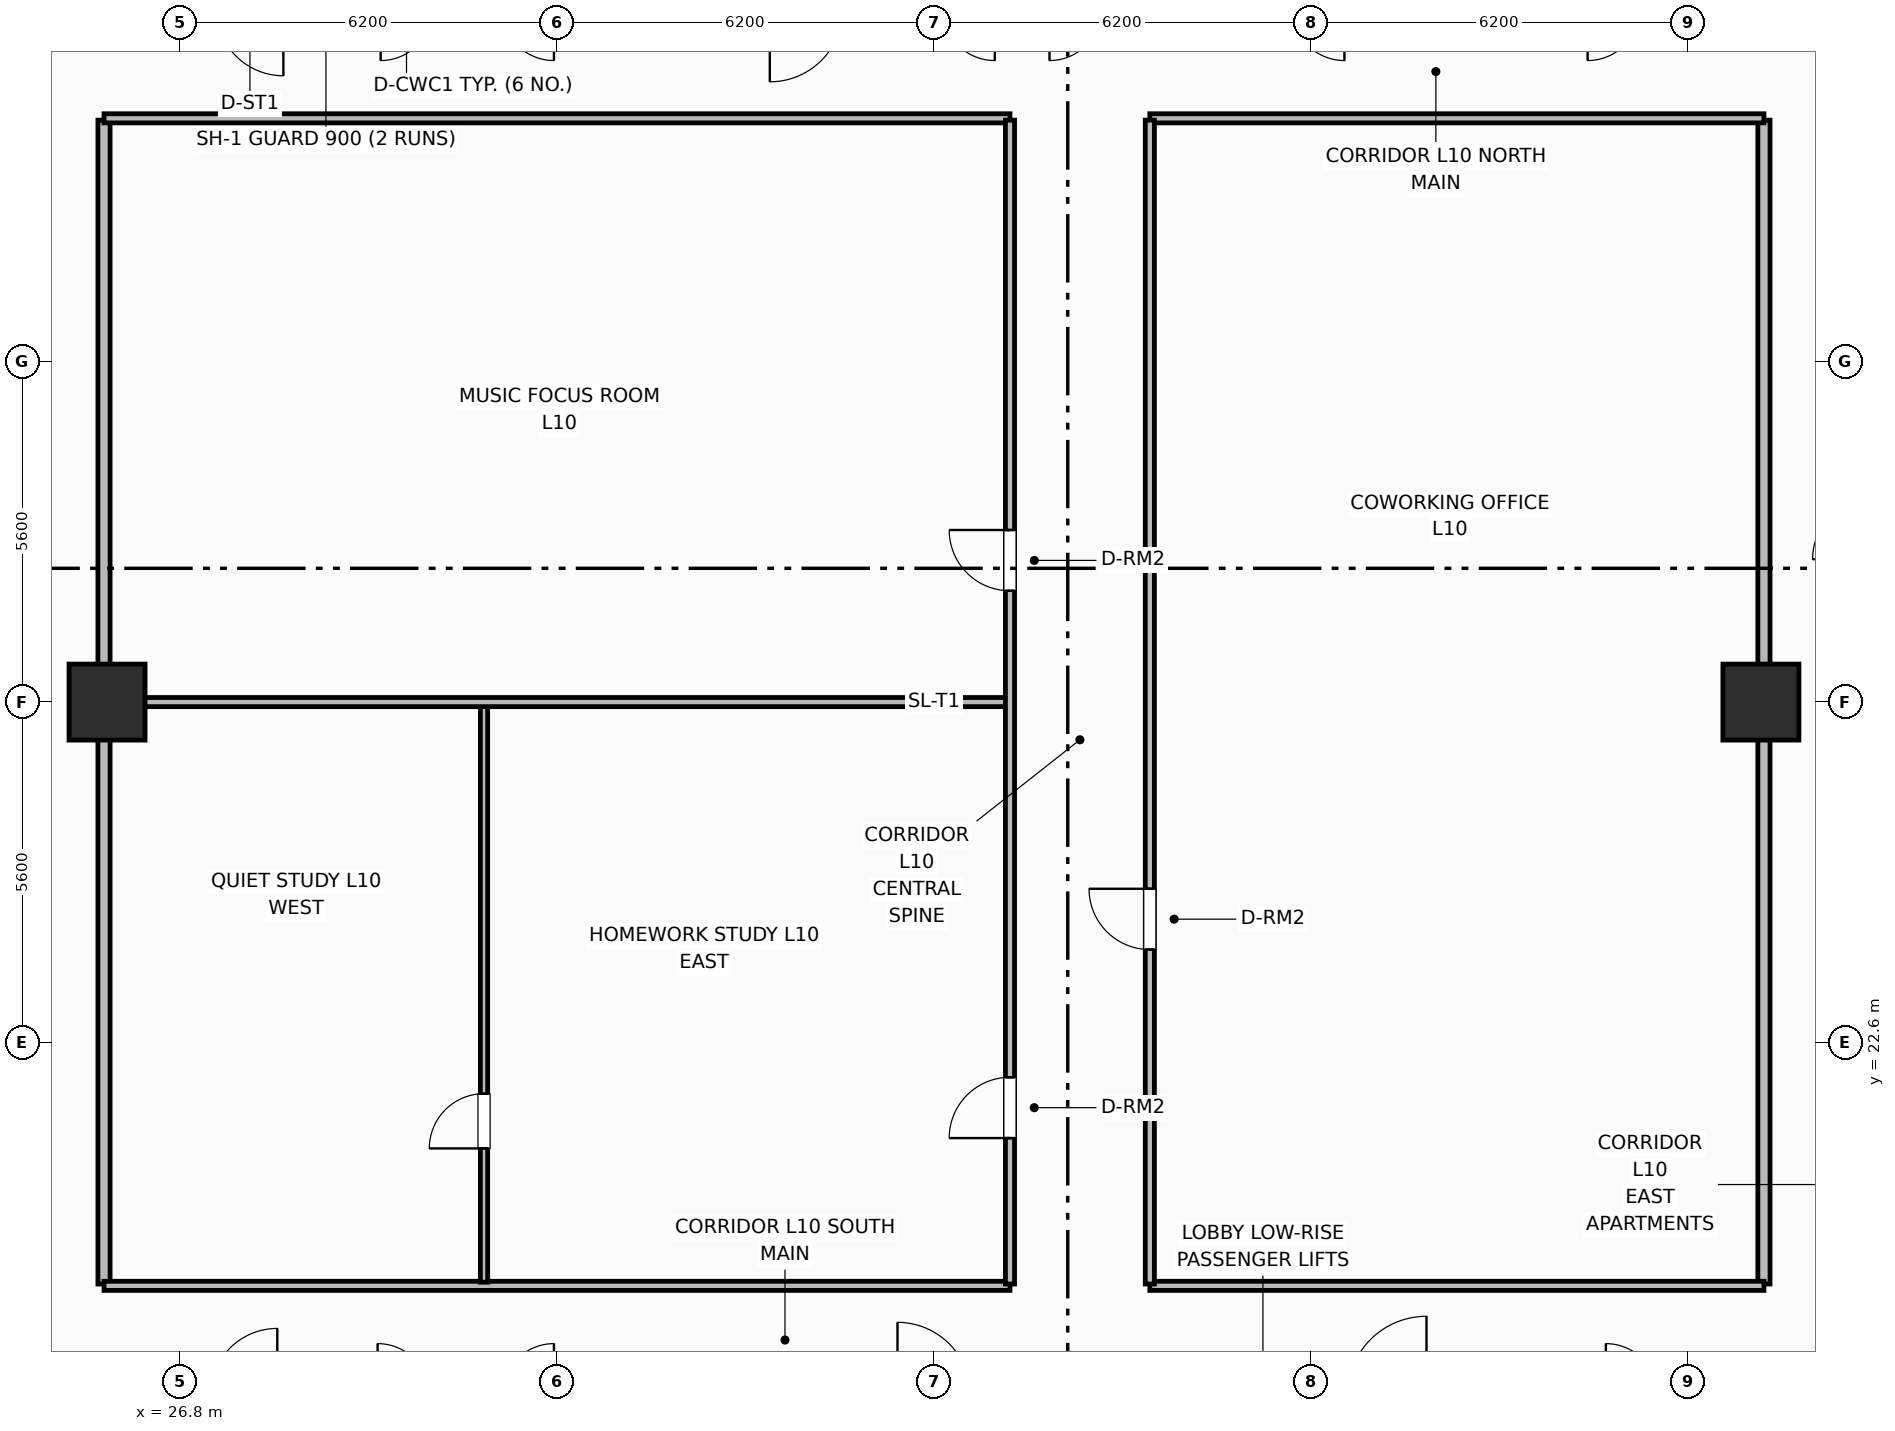
"""IFC4 building model, lengths in metres.
Left out: names, types, materials, properties, quantities, classifications, styles, units other than length and angle.
Written with IfcOpenShell. Run it as: python <this file> out.ifc"""

import sys

from ifc_helpers import new_model, si_unit, direction, frame, frame_2d, origin, origin_2d, place, context, subcontext, project, spatial, rectangle, extrude, element, fill, save


model = new_model("IFC4")
c1 = context("Model", 3, precision=1e-05, world=origin(), true_north=direction((0.0, 1.0)))
c2 = subcontext(c1, "Body", "Model", "MODEL_VIEW")
j1 = project(units=[si_unit("LENGTHUNIT", "METRE"), si_unit("PLANEANGLEUNIT", "RADIAN")], contexts=[c1])
p1 = place(None, origin())
s1 = spatial("IfcSite", under=j1, at=p1, CompositionType="ELEMENT")
p2 = place(p1, origin())
s2 = spatial("IfcBuilding", under=s1, at=p2, CompositionType="ELEMENT")
p3 = place(p2, frame((0.0, 0.0, 43.6)))
s3 = spatial("IfcBuildingStorey", under=s2, at=p3, CompositionType="ELEMENT", Elevation=43.6)
for number, where, z_axis, x_axis in (
    (1, (25.6, 28.2, 0.0), (0.0, 0.0, 1.0), (1.0, 0.0, 0.0)),
    (2, (52.8, 28.2, 0.0), (0.0, 0.0, 1.0), (1.0, 0.0, 0.0)),
):
    element("IfcColumn", number, at=place(p3, frame(where, z_axis=z_axis, x_axis=x_axis)), inside=s3, PredefinedType="COLUMN", context=c2, shape_type="SweptSolid", body=[
        extrude(rectangle(XDim=1.25, YDim=1.25, at=origin_2d()), origin(), (0.0, 0.0, 1.0), 3.7),
    ])
for number, where, z_axis, x_axis in (
    (3, (25.55, 18.63, 0.0), (0.0, 0.0, 1.0), (0.0, 1.0, 0.0)),
    (4, (52.85, 18.63, 0.0), (0.0, 0.0, 1.0), (0.0, 1.0, 0.0)),
):
    element("IfcWall", number, at=place(p3, frame(where, z_axis=z_axis, x_axis=x_axis)), inside=s3, PredefinedType="PARTITIONING", context=c2, shape_type="SweptSolid", body=[
        extrude(rectangle(XDim=19.14, YDim=0.2, at=frame_2d((9.57, 0.0))), origin(), (0.0, 0.0, 1.0), 2.53),
    ])
p4 = place(p3, frame((25.55, 18.6, 0.0), z_axis=(0.0, 0.0, 1.0), x_axis=(1.0, 0.0, 0.0)))
e5 = element("IfcWall", 5, at=p4, inside=s3, PredefinedType="PARTITIONING", context=c2, shape_type="SweptSolid", body=[
    extrude(rectangle(XDim=14.9, YDim=0.15, at=frame_2d((7.45, 0.0))), origin(), (0.0, 0.0, 1.0), 2.53),
])
p5 = place(p3, frame((42.75, 18.6, 0.0), z_axis=(0.0, 0.0, 1.0), x_axis=(1.0, 0.0, 0.0)))
e6 = element("IfcWall", 6, at=p5, inside=s3, PredefinedType="PARTITIONING", context=c2, shape_type="SweptSolid", body=[
    extrude(rectangle(XDim=10.1, YDim=0.15, at=frame_2d((5.05, 0.0))), origin(), (0.0, 0.0, 1.0), 2.53),
])
p6 = place(p3, frame((25.55, 37.8, 0.0), z_axis=(0.0, 0.0, 1.0), x_axis=(1.0, 0.0, 0.0)))
e7 = element("IfcWall", 7, at=p6, inside=s3, PredefinedType="PARTITIONING", context=c2, shape_type="SweptSolid", body=[
    extrude(rectangle(XDim=14.9, YDim=0.15, at=frame_2d((7.45, 0.0))), origin(), (0.0, 0.0, 1.0), 2.53),
])
p7 = place(p3, frame((42.75, 37.8, 0.0), z_axis=(0.0, 0.0, 1.0), x_axis=(1.0, 0.0, 0.0)))
e8 = element("IfcWall", 8, at=p7, inside=s3, PredefinedType="PARTITIONING", context=c2, shape_type="SweptSolid", body=[
    extrude(rectangle(XDim=10.1, YDim=0.15, at=frame_2d((5.05, 0.0))), origin(), (0.0, 0.0, 1.0), 2.53),
])
p8 = place(p3, frame((31.8, 18.66, 0.0), z_axis=(0.0, 0.0, 1.0), x_axis=(0.0, 1.0, 0.0)))
e9 = element("IfcWall", 9, at=p8, inside=s3, PredefinedType="PARTITIONING", context=c2, shape_type="SweptSolid", body=[
    extrude(rectangle(XDim=9.49, YDim=0.12, at=frame_2d((4.745, 0.0))), origin(), (0.0, 0.0, 1.0), 2.53),
])
p9 = place(p8, frame((2.2, 0.0, 0.0)))
e10 = element("IfcOpeningElement", 10, at=p9, cuts=e9, PredefinedType="OPENING", context=c2, shape_type="SweptSolid", body=[
    extrude(rectangle(XDim=0.9, YDim=2.1, at=frame_2d((0.45, 1.05))), frame((0.0, 0.07, 0.0), z_axis=(0.0, -1.0, 0.0), x_axis=(1.0, 0.0, 0.0)), (0.0, 0.0, 1.0), 0.14),
])
p10 = place(p3, frame((25.6, 28.2, 0.0), z_axis=(0.0, 0.0, 1.0), x_axis=(1.0, 0.0, 0.0)))
e11 = element("IfcWall", 11, at=p10, inside=s3, PredefinedType="PARTITIONING", context=c2, shape_type="SweptSolid", body=[
    extrude(rectangle(XDim=14.87, YDim=0.15, at=frame_2d((7.435, 0.0))), origin(), (0.0, 0.0, 1.0), 2.53),
])
p11 = place(p3, frame((40.45, 18.63, 0.0), z_axis=(0.0, 0.0, 1.0), x_axis=(0.0, 1.0, 0.0)))
e12 = element("IfcWall", 12, at=p11, inside=s3, PredefinedType="PARTITIONING", context=c2, shape_type="SweptSolid", body=[
    extrude(rectangle(XDim=19.14, YDim=0.15, at=frame_2d((9.57, 0.0))), origin(), (0.0, 0.0, 1.0), 2.53),
])
p12 = place(p11, frame((2.4, 0.0, 0.0)))
e13 = element("IfcOpeningElement", 13, at=p12, cuts=e12, PredefinedType="OPENING", context=c2, shape_type="SweptSolid", body=[
    extrude(rectangle(XDim=1.0, YDim=2.15, at=frame_2d((0.5, 1.075))), frame((0.0, 0.085, 0.0), z_axis=(0.0, -1.0, 0.0), x_axis=(1.0, 0.0, 0.0)), (0.0, 0.0, 1.0), 0.17),
])
p13 = place(p11, frame((11.4, 0.0, 0.0)))
e14 = element("IfcOpeningElement", 14, at=p13, cuts=e12, PredefinedType="OPENING", context=c2, shape_type="SweptSolid", body=[
    extrude(rectangle(XDim=1.0, YDim=2.15, at=frame_2d((0.5, 1.075))), frame((0.0, 0.085, 0.0), z_axis=(0.0, -1.0, 0.0), x_axis=(1.0, 0.0, 0.0)), (0.0, 0.0, 1.0), 0.17),
])
p14 = place(p3, frame((42.75, 18.63, 0.0), z_axis=(0.0, 0.0, 1.0), x_axis=(0.0, 1.0, 0.0)))
e15 = element("IfcWall", 15, at=p14, inside=s3, PredefinedType="PARTITIONING", context=c2, shape_type="SweptSolid", body=[
    extrude(rectangle(XDim=19.14, YDim=0.15, at=frame_2d((9.57, 0.0))), origin(), (0.0, 0.0, 1.0), 2.53),
])
p15 = place(p14, frame((5.5, 0.0, 0.0)))
e16 = element("IfcOpeningElement", 16, at=p15, cuts=e15, PredefinedType="OPENING", context=c2, shape_type="SweptSolid", body=[
    extrude(rectangle(XDim=1.0, YDim=2.15, at=frame_2d((0.5, 1.075))), frame((0.0, 0.085, 0.0), z_axis=(0.0, -1.0, 0.0), x_axis=(1.0, 0.0, 0.0)), (0.0, 0.0, 1.0), 0.17),
])
p16 = place(p9, origin())
e17 = element("IfcDoor", 17, at=p16, inside=s3, OperationType="SINGLE_SWING_LEFT", PredefinedType="DOOR", context=c2, shape_type="SweptSolid", body=[
    extrude(rectangle(XDim=0.9, YDim=2.1, at=frame_2d((0.45, 1.05))), frame((0.0, 0.025, 0.0), z_axis=(0.0, -1.0, 0.0), x_axis=(1.0, 0.0, 0.0)), (0.0, 0.0, 1.0), 0.05),
])
fill(e10, e17)
p17 = place(p12, origin())
e18 = element("IfcDoor", 18, at=p17, inside=s3, OperationType="SINGLE_SWING_LEFT", PredefinedType="DOOR", context=c2, shape_type="SweptSolid", body=[
    extrude(rectangle(XDim=1.0, YDim=2.15, at=frame_2d((0.5, 1.075))), frame((0.0, 0.025, 0.0), z_axis=(0.0, -1.0, 0.0), x_axis=(1.0, 0.0, 0.0)), (0.0, 0.0, 1.0), 0.05),
])
fill(e13, e18)
p18 = place(p13, origin())
e19 = element("IfcDoor", 19, at=p18, inside=s3, OperationType="SINGLE_SWING_RIGHT", PredefinedType="DOOR", context=c2, shape_type="SweptSolid", body=[
    extrude(rectangle(XDim=1.0, YDim=2.15, at=frame_2d((0.5, 1.075))), frame((0.0, 0.025, 0.0), z_axis=(0.0, -1.0, 0.0), x_axis=(1.0, 0.0, 0.0)), (0.0, 0.0, 1.0), 0.05),
])
fill(e14, e19)
p19 = place(p15, origin())
e20 = element("IfcDoor", 20, at=p19, inside=s3, OperationType="SINGLE_SWING_RIGHT", PredefinedType="DOOR", context=c2, shape_type="SweptSolid", body=[
    extrude(rectangle(XDim=1.0, YDim=2.15, at=frame_2d((0.5, 1.075))), frame((0.0, 0.025, 0.0), z_axis=(0.0, -1.0, 0.0), x_axis=(1.0, 0.0, 0.0)), (0.0, 0.0, 1.0), 0.05),
])
fill(e16, e20)
save(model, sys.argv[1])
